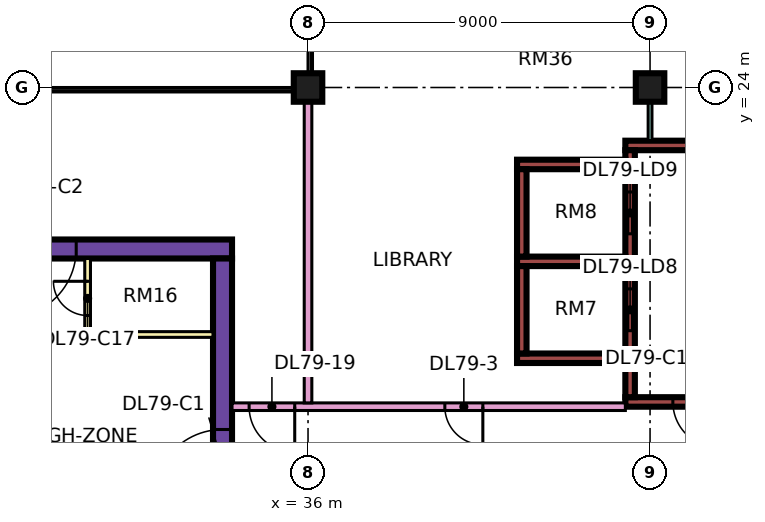
"""IFC4 building model, lengths in metres.
Left out: names, types, materials, properties, quantities, classifications, styles, units other than length and angle.
Written with IfcOpenShell. Run it as: python <this file> out.ifc"""

import sys

from ifc_helpers import new_model, si_unit, direction, frame, frame_2d, origin, origin_2d, place, context, subcontext, project, spatial, rectangle, extrude, element, fill, save


model = new_model("IFC4")
c1 = context("Model", 3, precision=1e-05, world=origin(), true_north=direction((0.0, 1.0)))
c2 = subcontext(c1, "Body", "Model", "MODEL_VIEW")
j1 = project(units=[si_unit("LENGTHUNIT", "METRE"), si_unit("PLANEANGLEUNIT", "RADIAN")], contexts=[c1])
p1 = place(None, origin())
s1 = spatial("IfcSite", under=j1, at=p1, CompositionType="ELEMENT")
p2 = place(p1, origin())
s2 = spatial("IfcBuilding", under=s1, at=p2, CompositionType="ELEMENT")
p3 = place(p2, frame((0.0, 0.0, 342.65)))
s3 = spatial("IfcBuildingStorey", under=s2, at=p3, CompositionType="ELEMENT", Elevation=342.65)
for number, where, z_axis, x_axis in (
    (1, (36.0, 24.0, 0.0), (0.0, 0.0, 1.0), (1.0, 0.0, 0.0)),
    (2, (45.0, 24.0, 0.0), (0.0, 0.0, 1.0), (1.0, 0.0, 0.0)),
):
    element("IfcColumn", number, at=place(p3, frame(where, z_axis=z_axis, x_axis=x_axis)), inside=s3, PredefinedType="COLUMN", context=c2, shape_type="SweptSolid", body=[
        extrude(rectangle(XDim=0.75, YDim=0.75, at=origin_2d()), origin(), (0.0, 0.0, 1.0), 3.75),
    ])
p4 = place(p3, frame((9.0, 19.75, 0.0), z_axis=(0.0, 0.0, 1.0), x_axis=(1.0, 0.0, 0.0)))
e3 = element("IfcWall", 3, at=p4, inside=s3, PredefinedType="SHEAR", context=c2, shape_type="SweptSolid", body=[
    extrude(rectangle(XDim=25.0, YDim=0.5, at=frame_2d((12.5, 0.0))), origin(), (0.0, 0.0, 1.0), 3.75),
])
p5 = place(p4, frame((19.1, 0.0, 0.0)))
e4 = element("IfcOpeningElement", 4, at=p5, cuts=e3, PredefinedType="OPENING", context=c2, shape_type="SweptSolid", body=[
    extrude(rectangle(XDim=1.8, YDim=2.4, at=frame_2d((0.9, 1.2))), frame((0.0, 0.26, 0.0), z_axis=(0.0, -1.0, 0.0), x_axis=(1.0, 0.0, 0.0)), (0.0, 0.0, 1.0), 0.52),
])
p6 = place(p3, frame((33.75, 7.5, 0.0), z_axis=(0.0, 0.0, 1.0), x_axis=(0.0, 1.0, 0.0)))
e5 = element("IfcWall", 5, at=p6, inside=s3, PredefinedType="SHEAR", context=c2, shape_type="SweptSolid", body=[
    extrude(rectangle(XDim=12.0, YDim=0.5, at=frame_2d((6.0, 0.0))), origin(), (0.0, 0.0, 1.0), 3.75),
])
p7 = place(p6, frame((5.7, 0.0, 0.0)))
e6 = element("IfcOpeningElement", 6, at=p7, cuts=e5, PredefinedType="OPENING", context=c2, shape_type="SweptSolid", body=[
    extrude(rectangle(XDim=1.8, YDim=2.4, at=frame_2d((0.9, 1.2))), frame((0.0, 0.26, 0.0), z_axis=(0.0, -1.0, 0.0), x_axis=(1.0, 0.0, 0.0)), (0.0, 0.0, 1.0), 0.52),
])
p8 = place(p3, frame((44.35, 15.725, 0.0), z_axis=(0.0, 0.0, 1.0), x_axis=(1.0, 0.0, 0.0)))
e7 = element("IfcWall", 7, at=p8, inside=s3, PredefinedType="SHEAR", context=c2, shape_type="SweptSolid", body=[
    extrude(rectangle(XDim=3.425, YDim=0.25, at=frame_2d((1.712, 0.0))), origin(), (0.0, 0.0, 1.0), 3.75),
])
p9 = place(p8, frame((1.25, 0.0, 0.0)))
e8 = element("IfcOpeningElement", 8, at=p9, cuts=e7, PredefinedType="OPENING", context=c2, shape_type="SweptSolid", body=[
    extrude(rectangle(XDim=1.2, YDim=2.2, at=frame_2d((0.6, 1.1))), frame((0.0, 0.135, 0.0), z_axis=(0.0, -1.0, 0.0), x_axis=(1.0, 0.0, 0.0)), (0.0, 0.0, 1.0), 0.27),
])
p10 = place(p3, frame((44.35, 22.475, 0.0), z_axis=(0.0, 0.0, 1.0), x_axis=(1.0, 0.0, 0.0)))
e9 = element("IfcWall", 9, at=p10, inside=s3, PredefinedType="SHEAR", context=c2, shape_type="SweptSolid", body=[
    extrude(rectangle(XDim=3.425, YDim=0.25, at=frame_2d((1.712, 0.0))), origin(), (0.0, 0.0, 1.0), 3.75),
])
p11 = place(p3, frame((44.475, 15.85, 0.0), z_axis=(0.0, 0.0, 1.0), x_axis=(0.0, 1.0, 0.0)))
e10 = element("IfcWall", 10, at=p11, inside=s3, PredefinedType="SHEAR", context=c2, shape_type="SweptSolid", body=[
    extrude(rectangle(XDim=6.5, YDim=0.25, at=frame_2d((3.25, 0.0))), origin(), (0.0, 0.0, 1.0), 3.75),
])
p12 = place(p11, frame((1.75, 0.0, 0.0)))
e11 = element("IfcOpeningElement", 11, at=p12, cuts=e10, PredefinedType="OPENING", context=c2, shape_type="SweptSolid", body=[
    extrude(rectangle(XDim=1.1, YDim=2.2, at=frame_2d((0.55, 1.1))), frame((0.0, 0.135, 0.0), z_axis=(0.0, -1.0, 0.0), x_axis=(1.0, 0.0, 0.0)), (0.0, 0.0, 1.0), 0.27),
])
p13 = place(p11, frame((4.3, 0.0, 0.0)))
e12 = element("IfcOpeningElement", 12, at=p13, cuts=e10, PredefinedType="OPENING", context=c2, shape_type="SweptSolid", body=[
    extrude(rectangle(XDim=1.1, YDim=2.2, at=frame_2d((0.55, 1.1))), frame((0.0, 0.135, 0.0), z_axis=(0.0, -1.0, 0.0), x_axis=(1.0, 0.0, 0.0)), (0.0, 0.0, 1.0), 0.27),
])
for number, where, z_axis, x_axis in (
    (13, (41.5, 16.875, 0.0), (0.0, 0.0, 1.0), (1.0, 0.0, 0.0)),
    (14, (41.5, 19.425, 0.0), (0.0, 0.0, 1.0), (1.0, 0.0, 0.0)),
    (15, (41.5, 21.975, 0.0), (0.0, 0.0, 1.0), (1.0, 0.0, 0.0)),
):
    element("IfcWall", number, at=place(p3, frame(where, z_axis=z_axis, x_axis=x_axis)), inside=s3, PredefinedType="SHEAR", context=c2, shape_type="SweptSolid", body=[
        extrude(rectangle(XDim=2.85, YDim=0.25, at=frame_2d((1.425, 0.0))), origin(), (0.0, 0.0, 1.0), 3.75),
    ])
for number, where, z_axis, x_axis in (
    (16, (41.625, 17.0, 0.0), (0.0, 0.0, 1.0), (0.0, 1.0, 0.0)),
    (17, (41.625, 19.55, 0.0), (0.0, 0.0, 1.0), (0.0, 1.0, 0.0)),
):
    element("IfcWall", number, at=place(p3, frame(where, z_axis=z_axis, x_axis=x_axis)), inside=s3, PredefinedType="SHEAR", context=c2, shape_type="SweptSolid", body=[
        extrude(rectangle(XDim=2.3, YDim=0.25, at=frame_2d((1.15, 0.0))), origin(), (0.0, 0.0, 1.0), 3.75),
    ])
p14 = place(p3, frame((30.2, 17.5, 0.0), z_axis=(0.0, 0.0, 1.0), x_axis=(0.0, 1.0, 0.0)))
e18 = element("IfcWall", 18, at=p14, inside=s3, PredefinedType="PARTITIONING", context=c2, shape_type="SweptSolid", body=[
    extrude(rectangle(XDim=2.0, YDim=0.15, at=frame_2d((1.0, 0.0))), origin(), (0.0, 0.0, 1.0), 3.35),
])
p15 = place(p14, frame((0.5, 0.0, 0.0)))
e19 = element("IfcOpeningElement", 19, at=p15, cuts=e18, PredefinedType="OPENING", context=c2, shape_type="SweptSolid", body=[
    extrude(rectangle(XDim=0.9, YDim=2.1, at=frame_2d((0.45, 1.05))), frame((0.0, 0.085, 0.0), z_axis=(0.0, -1.0, 0.0), x_axis=(1.0, 0.0, 0.0)), (0.0, 0.0, 1.0), 0.17),
])
p16 = place(p3, frame((30.2, 17.5, 0.0), z_axis=(0.0, 0.0, 1.0), x_axis=(1.0, 0.0, 0.0)))
e20 = element("IfcWall", 20, at=p16, inside=s3, PredefinedType="PARTITIONING", context=c2, shape_type="SweptSolid", body=[
    extrude(rectangle(XDim=3.3, YDim=0.15, at=frame_2d((1.65, 0.0))), origin(), (0.0, 0.0, 1.0), 3.35),
])
p17 = place(p3, frame((34.0, 15.6, 0.0), z_axis=(0.0, 0.0, 1.0), x_axis=(1.0, 0.0, 0.0)))
e21 = element("IfcWall", 21, at=p17, inside=s3, PredefinedType="PARTITIONING", context=c2, shape_type="SweptSolid", body=[
    extrude(rectangle(XDim=10.35, YDim=0.2, at=frame_2d((5.175, 0.0))), origin(), (0.0, 0.0, 1.0), 3.35),
])
p18 = place(p17, frame((5.6, 0.0, 0.0)))
e22 = element("IfcOpeningElement", 22, at=p18, cuts=e21, PredefinedType="OPENING", context=c2, shape_type="SweptSolid", body=[
    extrude(rectangle(XDim=1.0, YDim=2.1, at=frame_2d((0.5, 1.05))), frame((0.0, 0.11, 0.0), z_axis=(0.0, -1.0, 0.0), x_axis=(1.0, 0.0, 0.0)), (0.0, 0.0, 1.0), 0.22),
])
p19 = place(p17, frame((0.45, 0.0, 0.0)))
e23 = element("IfcOpeningElement", 23, at=p19, cuts=e21, PredefinedType="OPENING", context=c2, shape_type="SweptSolid", body=[
    extrude(rectangle(XDim=1.2, YDim=2.1, at=frame_2d((0.6, 1.05))), frame((0.0, 0.11, 0.0), z_axis=(0.0, -1.0, 0.0), x_axis=(1.0, 0.0, 0.0)), (0.0, 0.0, 1.0), 0.22),
])
p20 = place(p3, frame((36.0, 15.7, 0.0), z_axis=(0.0, 0.0, 1.0), x_axis=(0.0, 1.0, 0.0)))
e24 = element("IfcWall", 24, at=p20, inside=s3, PredefinedType="PARTITIONING", context=c2, shape_type="SweptSolid", body=[
    extrude(rectangle(XDim=8.3, YDim=0.2, at=frame_2d((4.15, 0.0))), origin(), (0.0, 0.0, 1.0), 3.35),
])
p21 = place(p3, frame((45.0, 22.6, 0.0), z_axis=(0.0, 0.0, 1.0), x_axis=(0.0, 1.0, 0.0)))
e25 = element("IfcWall", 25, at=p21, inside=s3, PredefinedType="PARTITIONING", context=c2, shape_type="SweptSolid", body=[
    extrude(rectangle(XDim=1.4, YDim=0.1, at=frame_2d((0.7, 0.0))), origin(), (0.0, 0.0, 1.0), 3.35),
])
p22 = place(p7, origin())
e26 = element("IfcDoor", 26, at=p22, inside=s3, OperationType="DOUBLE_DOOR_SINGLE_SWING", PredefinedType="DOOR", context=c2, shape_type="SweptSolid", body=[
    extrude(rectangle(XDim=1.8, YDim=2.4, at=frame_2d((0.9, 1.2))), frame((0.0, 0.025, 0.0), z_axis=(0.0, -1.0, 0.0), x_axis=(1.0, 0.0, 0.0)), (0.0, 0.0, 1.0), 0.05),
])
fill(e6, e26)
p23 = place(p5, frame((1.8, 0.0, 0.0), z_axis=(0.0, 0.0, 1.0), x_axis=(-1.0, 0.0, 0.0)))
e27 = element("IfcDoor", 27, at=p23, inside=s3, OperationType="DOUBLE_DOOR_SINGLE_SWING", PredefinedType="DOOR", context=c2, shape_type="SweptSolid", body=[
    extrude(rectangle(XDim=1.8, YDim=2.4, at=frame_2d((0.9, 1.2))), frame((0.0, 0.025, 0.0), z_axis=(0.0, -1.0, 0.0), x_axis=(1.0, 0.0, 0.0)), (0.0, 0.0, 1.0), 0.05),
])
fill(e4, e27)
p24 = place(p9, origin())
e28 = element("IfcDoor", 28, at=p24, inside=s3, OperationType="SINGLE_SWING_RIGHT", PredefinedType="DOOR", context=c2, shape_type="SweptSolid", body=[
    extrude(rectangle(XDim=1.2, YDim=2.2, at=frame_2d((0.6, 1.1))), frame((0.0, 0.025, 0.0), z_axis=(0.0, -1.0, 0.0), x_axis=(1.0, 0.0, 0.0)), (0.0, 0.0, 1.0), 0.05),
])
fill(e8, e28)
p25 = place(p12, origin())
e29 = element("IfcDoor", 29, at=p25, inside=s3, OperationType="DOUBLE_DOOR_SLIDING", PredefinedType="DOOR", context=c2, shape_type="SweptSolid", body=[
    extrude(rectangle(XDim=1.1, YDim=2.2, at=frame_2d((0.55, 1.1))), frame((0.0, 0.025, 0.0), z_axis=(0.0, -1.0, 0.0), x_axis=(1.0, 0.0, 0.0)), (0.0, 0.0, 1.0), 0.05),
])
fill(e11, e29)
p26 = place(p13, origin())
e30 = element("IfcDoor", 30, at=p26, inside=s3, OperationType="DOUBLE_DOOR_SLIDING", PredefinedType="DOOR", context=c2, shape_type="SweptSolid", body=[
    extrude(rectangle(XDim=1.1, YDim=2.2, at=frame_2d((0.55, 1.1))), frame((0.0, 0.025, 0.0), z_axis=(0.0, -1.0, 0.0), x_axis=(1.0, 0.0, 0.0)), (0.0, 0.0, 1.0), 0.05),
])
fill(e12, e30)
p27 = place(p15, frame((0.9, 0.0, 0.0), z_axis=(0.0, 0.0, 1.0), x_axis=(-1.0, 0.0, 0.0)))
e31 = element("IfcDoor", 31, at=p27, inside=s3, OperationType="SINGLE_SWING_RIGHT", PredefinedType="DOOR", context=c2, shape_type="SweptSolid", body=[
    extrude(rectangle(XDim=0.9, YDim=2.1, at=frame_2d((0.45, 1.05))), frame((0.0, 0.025, 0.0), z_axis=(0.0, -1.0, 0.0), x_axis=(1.0, 0.0, 0.0)), (0.0, 0.0, 1.0), 0.05),
])
fill(e19, e31)
p28 = place(p18, origin())
e32 = element("IfcDoor", 32, at=p28, inside=s3, OperationType="SINGLE_SWING_RIGHT", PredefinedType="DOOR", context=c2, shape_type="SweptSolid", body=[
    extrude(rectangle(XDim=1.0, YDim=2.1, at=frame_2d((0.5, 1.05))), frame((0.0, 0.025, 0.0), z_axis=(0.0, -1.0, 0.0), x_axis=(1.0, 0.0, 0.0)), (0.0, 0.0, 1.0), 0.05),
])
fill(e22, e32)
p29 = place(p19, origin())
e33 = element("IfcDoor", 33, at=p29, inside=s3, OperationType="SINGLE_SWING_RIGHT", PredefinedType="DOOR", context=c2, shape_type="SweptSolid", body=[
    extrude(rectangle(XDim=1.2, YDim=2.1, at=frame_2d((0.6, 1.05))), frame((0.0, 0.025, 0.0), z_axis=(0.0, -1.0, 0.0), x_axis=(1.0, 0.0, 0.0)), (0.0, 0.0, 1.0), 0.05),
])
fill(e23, e33)
save(model, sys.argv[1])
